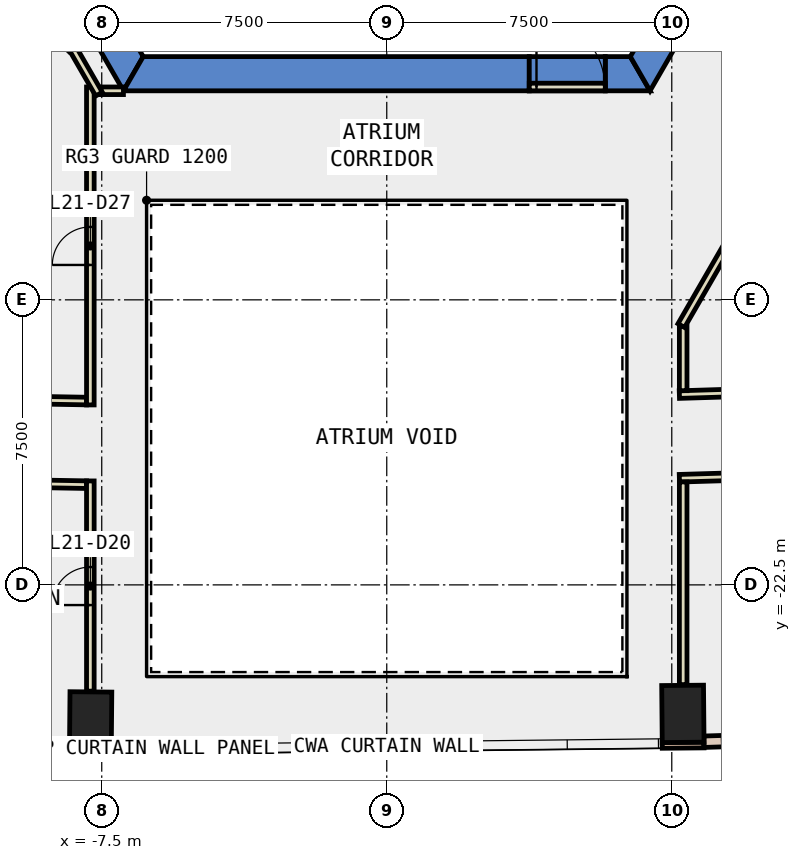
"""IFC4 building model, lengths in metres.
Left out: names, types, materials, properties, quantities, classifications, styles, units other than length and angle.
Written with IfcOpenShell. Run it as: python <this file> out.ifc"""

import sys

from ifc_helpers import new_model, si_unit, direction, frame, frame_2d, origin, origin_2d, place, context, subcontext, project, spatial, polyline, rectangle, outline, extrude, element, fill, save


model = new_model("IFC4")
c1 = context("Model", 3, precision=1e-05, world=origin(), true_north=direction((0.0, 1.0)))
c2 = subcontext(c1, "Body", "Model", "MODEL_VIEW")
j1 = project(units=[si_unit("LENGTHUNIT", "METRE"), si_unit("PLANEANGLEUNIT", "RADIAN")], contexts=[c1])
p1 = place(None, origin())
s1 = spatial("IfcSite", under=j1, at=p1, CompositionType="ELEMENT")
p2 = place(p1, origin())
s2 = spatial("IfcBuilding", under=s1, at=p2, CompositionType="ELEMENT")
p3 = place(p2, frame((0.0, 0.0, 99.2)))
s3 = spatial("IfcBuildingStorey", under=s2, at=p3, CompositionType="ELEMENT", Elevation=99.2)
for number, where, z_axis, x_axis in (
    (1, (-7.792, -26.066, -0.4), (0.0, 0.0, 1.0), (-1.0, 0.009, 0.0)),
    (2, (7.792, -25.894, -0.4), (0.0, 0.0, 1.0), (1.0, 0.009, 0.0)),
):
    element("IfcColumn", number, at=place(p3, frame(where, z_axis=z_axis, x_axis=x_axis)), inside=s3, PredefinedType="COLUMN", context=c2, shape_type="SweptSolid", body=[
        extrude(rectangle(XDim=1.1, YDim=1.5, at=origin_2d()), origin(), (0.0, 0.0, 1.0), 4.2),
    ])
p4 = place(p3, frame((0.0, 0.0, -0.4)))
e3 = element("IfcWall", 3, at=p4, inside=s3, PredefinedType="SHEAR", context=c2, shape_type="SweptSolid", body=[
    extrude(outline(polyline([(-13.856, 2.5), (-6.928, -9.5), (-6.409, -8.6), (-12.817, 2.5), (-13.856, 2.5)])), origin(), (0.0, 0.0, 1.0), 4.2),
])
p5 = place(p3, frame((0.0, 0.0, -0.4)))
e4 = element("IfcWall", 4, at=p5, inside=s3, PredefinedType="SHEAR", context=c2, shape_type="SweptSolid", body=[
    extrude(outline(polyline([(3.75, -9.5), (3.75, -8.6), (-6.409, -8.6), (-6.928, -9.5), (3.75, -9.5)])), origin(), (0.0, 0.0, 1.0), 4.2),
])
p6 = place(p3, frame((0.0, 0.0, -0.4)))
e5 = element("IfcWall", 5, at=p6, inside=s3, PredefinedType="SHEAR", context=c2, shape_type="SweptSolid", body=[
    extrude(outline(polyline([(5.75, -8.6), (5.75, -9.5), (6.928, -9.5), (6.409, -8.6), (5.75, -8.6)])), origin(), (0.0, 0.0, 1.0), 4.2),
])
p7 = place(p3, frame((0.0, 0.0, 3.6)))
e6 = element("IfcWall", 6, at=p7, inside=s3, PredefinedType="SHEAR", context=c2, shape_type="SweptSolid", body=[
    extrude(outline(polyline([(5.75, -9.5), (5.75, -8.6), (3.75, -8.6), (3.75, -9.5), (5.75, -9.5)])), origin(), (0.0, 0.0, 1.0), 0.2),
])
p8 = place(p3, frame((0.0, 0.0, -0.4)))
e7 = element("IfcWall", 7, at=p8, inside=s3, PredefinedType="SHEAR", context=c2, shape_type="SweptSolid", body=[
    extrude(outline(polyline([(8.117, -7.44), (7.338, -6.99), (6.409, -8.6), (6.928, -9.5), (8.117, -7.44)])), origin(), (0.0, 0.0, 1.0), 4.2),
])
for number, where, z_axis, x_axis in (
    (8, (-8.349, -26.886, 0.0), (0.0, 0.0, 1.0), (1.0, -0.009, 0.0)),
    (9, (7.249, -26.724, 0.0), (0.0, 0.0, 1.0), (1.0, 0.009, 0.0)),
):
    element("IfcWall", number, at=place(p3, frame(where, z_axis=z_axis, x_axis=x_axis)), inside=s3, PredefinedType="STANDARD", context=c2, shape_type="SweptSolid", body=[
        extrude(rectangle(XDim=1.1, YDim=0.15, at=frame_2d((0.55, 0.0))), origin(), (0.0, 0.0, 1.0), 3.8),
    ])
p9 = place(p3, frame((-14.242, -26.703, 0.0), z_axis=(0.0, 0.0, 1.0), x_axis=(0.999847261365, -0.017477240672, 0.0)))
e10 = element("IfcWall", 10, at=p9, inside=s3, PredefinedType="STANDARD", context=c2, shape_type="SweptSolid", body=[
    extrude(rectangle(XDim=5.895, YDim=0.3, at=frame_2d((2.948, 0.0))), origin(), (0.0, 0.0, 1.0), 3.8),
])
p10 = place(p9, frame((0.474, 0.0, 0.9)))
e11 = element("IfcOpeningElement", 11, at=p10, cuts=e10, PredefinedType="OPENING", context=c2, shape_type="SweptSolid", body=[
    extrude(rectangle(XDim=2.0, YDim=2.6, at=frame_2d((1.0, 1.3))), frame((0.0, 0.16, 0.0), z_axis=(0.0, -1.0, 0.0), x_axis=(1.0, 0.0, 0.0)), (0.0, 0.0, 1.0), 0.32),
])
p11 = place(p9, frame((3.421, 0.0, 0.9)))
e12 = element("IfcOpeningElement", 12, at=p11, cuts=e10, PredefinedType="OPENING", context=c2, shape_type="SweptSolid", body=[
    extrude(rectangle(XDim=2.0, YDim=2.6, at=frame_2d((1.0, 1.3))), frame((0.0, 0.16, 0.0), z_axis=(0.0, -1.0, 0.0), x_axis=(1.0, 0.0, 0.0)), (0.0, 0.0, 1.0), 0.32),
])
p12 = place(p3, frame((8.347, -26.627, 0.0), z_axis=(0.0, 0.0, 1.0), x_axis=(0.999529601824, 0.030668796478, 0.0)))
e13 = element("IfcWall", 13, at=p12, inside=s3, PredefinedType="STANDARD", context=c2, shape_type="SweptSolid", body=[
    extrude(rectangle(XDim=5.899, YDim=0.3, at=frame_2d((2.949, 0.0))), origin(), (0.0, 0.0, 1.0), 3.8),
])
p13 = place(p12, frame((0.475, 0.0, 0.9)))
e14 = element("IfcOpeningElement", 14, at=p13, cuts=e13, PredefinedType="OPENING", context=c2, shape_type="SweptSolid", body=[
    extrude(rectangle(XDim=2.0, YDim=2.6, at=frame_2d((1.0, 1.3))), frame((0.0, 0.16, 0.0), z_axis=(0.0, -1.0, 0.0), x_axis=(1.0, 0.0, 0.0)), (0.0, 0.0, 1.0), 0.32),
])
p14 = place(p12, frame((3.424, 0.0, 0.9)))
e15 = element("IfcOpeningElement", 15, at=p14, cuts=e13, PredefinedType="OPENING", context=c2, shape_type="SweptSolid", body=[
    extrude(rectangle(XDim=2.0, YDim=2.6, at=frame_2d((1.0, 1.3))), frame((0.0, 0.16, 0.0), z_axis=(0.0, -1.0, 0.0), x_axis=(1.0, 0.0, 0.0)), (0.0, 0.0, 1.0), 0.32),
])
p15 = place(p3, frame((7.7, -17.493, 0.0), z_axis=(0.0, 0.0, 1.0), x_axis=(0.999526319751, 0.030775576778, 0.0)))
e16 = element("IfcWall", 16, at=p15, inside=s3, PredefinedType="PARTITIONING", context=c2, shape_type="SweptSolid", body=[
    extrude(rectangle(XDim=6.822, YDim=0.2, at=frame_2d((3.411, 0.0))), origin(), (0.0, 0.0, 1.0), 3.8),
])
p16 = place(p15, frame((2.911, 0.0, 0.0)))
e17 = element("IfcOpeningElement", 17, at=p16, cuts=e16, PredefinedType="OPENING", context=c2, shape_type="SweptSolid", body=[
    extrude(rectangle(XDim=1.0, YDim=2.1, at=frame_2d((0.5, 1.05))), frame((0.0, 0.11, 0.0), z_axis=(0.0, -1.0, 0.0), x_axis=(1.0, 0.0, 0.0)), (0.0, 0.0, 1.0), 0.22),
])
p17 = place(p3, frame((-10.923, -17.61, 0.0), z_axis=(0.0, 0.0, 1.0), x_axis=(0.999846489632, -0.017521334753, 0.0)))
e18 = element("IfcWall", 18, at=p17, inside=s3, PredefinedType="PARTITIONING", context=c2, shape_type="SweptSolid", body=[
    extrude(rectangle(XDim=3.024, YDim=0.2, at=frame_2d((1.512, 0.0))), origin(), (0.0, 0.0, 1.0), 3.8),
])
p18 = place(p3, frame((21.621, -19.28, 0.0), z_axis=(0.0, 0.0, 1.0), x_axis=(-0.999557957525, -0.029730280001, 0.0)))
e19 = element("IfcWall", 19, at=p18, inside=s3, PredefinedType="PARTITIONING", context=c2, shape_type="SweptSolid", body=[
    extrude(rectangle(XDim=13.927, YDim=0.2, at=frame_2d((6.964, 0.0))), origin(), (0.0, 0.0, 1.0), 3.8),
])
p19 = place(p18, frame((6.464, 0.0, 0.0)))
e20 = element("IfcOpeningElement", 20, at=p19, cuts=e19, PredefinedType="OPENING", context=c2, shape_type="SweptSolid", body=[
    extrude(rectangle(XDim=1.0, YDim=2.1, at=frame_2d((0.5, 1.05))), frame((0.0, 0.11, 0.0), z_axis=(0.0, -1.0, 0.0), x_axis=(1.0, 0.0, 0.0)), (0.0, 0.0, 1.0), 0.22),
])
p20 = place(p3, frame((-7.9, -19.863, 0.0), z_axis=(0.0, 0.0, 1.0), x_axis=(-0.999845883554, 0.017555886191, 0.0)))
e21 = element("IfcWall", 21, at=p20, inside=s3, PredefinedType="PARTITIONING", context=c2, shape_type="SweptSolid", body=[
    extrude(rectangle(XDim=3.198, YDim=0.2, at=frame_2d((1.599, 0.0))), origin(), (0.0, 0.0, 1.0), 3.8),
])
p21 = place(p3, frame((7.8, -15.69, 0.0), z_axis=(0.0, 0.0, 1.0), x_axis=(0.0, -1.0, 0.0)))
e22 = element("IfcWall", 22, at=p21, inside=s3, PredefinedType="PARTITIONING", context=c2, shape_type="SweptSolid", body=[
    extrude(rectangle(XDim=1.7, YDim=0.2, at=frame_2d((0.85, 0.0))), origin(), (0.0, 0.0, 1.0), 3.8),
])
p22 = place(p3, frame((-7.522, -9.499, 0.0), z_axis=(0.0, 0.0, 1.0), x_axis=(1.0, 0.0, 0.0)))
e23 = element("IfcWall", 23, at=p22, inside=s3, PredefinedType="PARTITIONING", context=c2, shape_type="SweptSolid", body=[
    extrude(rectangle(XDim=0.593, YDim=0.2, at=frame_2d((0.296, 0.0))), origin(), (0.0, 0.0, 1.0), 3.8),
])
p23 = place(p3, frame((-7.8, -17.765, 0.0), z_axis=(0.0, 0.0, 1.0), x_axis=(0.0, 1.0, 0.0)))
e24 = element("IfcWall", 24, at=p23, inside=s3, PredefinedType="PARTITIONING", context=c2, shape_type="SweptSolid", body=[
    extrude(rectangle(XDim=8.366, YDim=0.2, at=frame_2d((4.183, 0.0))), origin(), (0.0, 0.0, 1.0), 3.8),
])
p24 = place(p23, frame((3.683, 0.0, 0.0)))
e25 = element("IfcOpeningElement", 25, at=p24, cuts=e24, PredefinedType="OPENING", context=c2, shape_type="SweptSolid", body=[
    extrude(rectangle(XDim=1.0, YDim=2.1, at=frame_2d((0.5, 1.05))), frame((0.0, 0.11, 0.0), z_axis=(0.0, -1.0, 0.0), x_axis=(1.0, 0.0, 0.0)), (0.0, 0.0, 1.0), 0.22),
])
p25 = place(p3, frame((7.8, -19.791, 0.0), z_axis=(0.0, 0.0, 1.0), x_axis=(0.0, -1.0, 0.0)))
e26 = element("IfcWall", 26, at=p25, inside=s3, PredefinedType="PARTITIONING", context=c2, shape_type="SweptSolid", body=[
    extrude(rectangle(XDim=5.333, YDim=0.2, at=frame_2d((2.667, 0.0))), origin(), (0.0, 0.0, 1.0), 3.8),
])
p26 = place(p3, frame((-7.8, -25.296, 0.0), z_axis=(0.0, 0.0, 1.0), x_axis=(0.0, 1.0, 0.0)))
e27 = element("IfcWall", 27, at=p26, inside=s3, PredefinedType="PARTITIONING", context=c2, shape_type="SweptSolid", body=[
    extrude(rectangle(XDim=5.531, YDim=0.2, at=frame_2d((2.766, 0.0))), origin(), (0.0, 0.0, 1.0), 3.8),
])
p27 = place(p26, frame((2.265, 0.0, 0.0)))
e28 = element("IfcOpeningElement", 28, at=p27, cuts=e27, PredefinedType="OPENING", context=c2, shape_type="SweptSolid", body=[
    extrude(rectangle(XDim=1.0, YDim=2.1, at=frame_2d((0.5, 1.05))), frame((0.0, 0.11, 0.0), z_axis=(0.0, -1.0, 0.0), x_axis=(1.0, 0.0, 0.0)), (0.0, 0.0, 1.0), 0.22),
])
p28 = place(p3, frame((12.401, -7.621, 0.0), z_axis=(0.0, 0.0, 1.0), x_axis=(-0.499983724212, -0.866034800411, 0.0)))
e29 = element("IfcWall", 29, at=p28, inside=s3, PredefinedType="PARTITIONING", context=c2, shape_type="SweptSolid", body=[
    extrude(rectangle(XDim=9.302, YDim=0.2, at=frame_2d((4.651, 0.0))), origin(), (0.0, 0.0, 1.0), 3.8),
])
p29 = place(p3, frame((-7.572, -9.586, 0.0), z_axis=(0.0, 0.0, 1.0), x_axis=(-0.499484152563, 0.866323023669, 0.0)))
e30 = element("IfcWall", 30, at=p29, inside=s3, PredefinedType="PARTITIONING", context=c2, shape_type="SweptSolid", body=[
    extrude(rectangle(XDim=1.39, YDim=0.2, at=frame_2d((0.695, 0.0))), origin(), (0.0, 0.0, 1.0), 3.8),
])
p30 = place(p3, frame((3.75, -9.4, 0.0), z_axis=(0.0, 0.0, 1.0), x_axis=(1.0, 0.0, 0.0)))
e31 = element("IfcWall", 31, at=p30, inside=s3, PredefinedType="PARTITIONING", context=c2, shape_type="SweptSolid", body=[
    extrude(rectangle(XDim=2.0, YDim=0.2, at=frame_2d((1.0, 0.0))), origin(), (0.0, 0.0, 1.0), 2.4),
])
p31 = place(p30, frame((0.19, 0.0, 0.0)))
e32 = element("IfcOpeningElement", 32, at=p31, cuts=e31, PredefinedType="OPENING", context=c2, shape_type="SweptSolid", body=[
    extrude(rectangle(XDim=1.8, YDim=2.1, at=frame_2d((0.9, 1.05))), frame((0.0, 0.11, 0.0), z_axis=(0.0, -1.0, 0.0), x_axis=(1.0, 0.0, 0.0)), (0.0, 0.0, 1.0), 0.22),
])
p32 = place(p27, origin())
e33 = element("IfcDoor", 33, at=p32, inside=s3, OperationType="SINGLE_SWING_LEFT", PredefinedType="DOOR", context=c2, shape_type="SweptSolid", body=[
    extrude(rectangle(XDim=1.0, YDim=2.1, at=frame_2d((0.5, 1.05))), frame((0.0, 0.025, 0.0), z_axis=(0.0, -1.0, 0.0), x_axis=(1.0, 0.0, 0.0)), (0.0, 0.0, 1.0), 0.05),
])
fill(e28, e33)
p33 = place(p24, origin())
e34 = element("IfcDoor", 34, at=p33, inside=s3, OperationType="SINGLE_SWING_RIGHT", PredefinedType="DOOR", context=c2, shape_type="SweptSolid", body=[
    extrude(rectangle(XDim=1.0, YDim=2.1, at=frame_2d((0.5, 1.05))), frame((0.0, 0.025, 0.0), z_axis=(0.0, -1.0, 0.0), x_axis=(1.0, 0.0, 0.0)), (0.0, 0.0, 1.0), 0.05),
])
fill(e25, e34)
p34 = place(p31, origin())
e35 = element("IfcDoor", 35, at=p34, inside=s3, OperationType="DOUBLE_DOOR_SINGLE_SWING", PredefinedType="DOOR", context=c2, shape_type="SweptSolid", body=[
    extrude(rectangle(XDim=1.8, YDim=2.1, at=frame_2d((0.9, 1.05))), frame((0.0, 0.025, 0.0), z_axis=(0.0, -1.0, 0.0), x_axis=(1.0, 0.0, 0.0)), (0.0, 0.0, 1.0), 0.05),
])
fill(e32, e35)
save(model, sys.argv[1])
